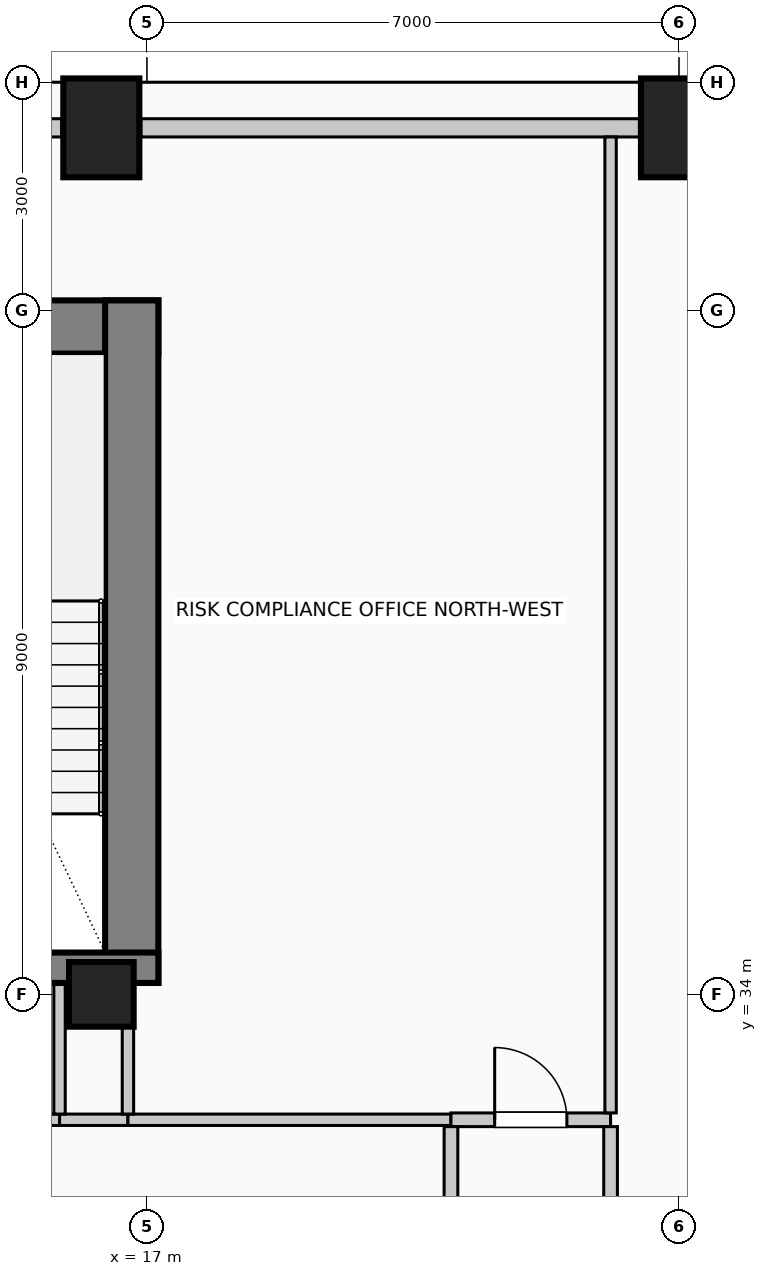
"""IFC4 building model, lengths in metres.
Left out: names, types, materials, properties, quantities, classifications, styles, units other than length and angle.
Written with IfcOpenShell. Run it as: python <this file> out.ifc"""

import sys

from ifc_helpers import new_model, si_unit, direction, frame, frame_2d, origin, origin_2d, place, context, subcontext, project, spatial, rectangle, circle, extrude, element, fill, save


model = new_model("IFC4")
c1 = context("Model", 3, precision=1e-05, world=origin(), true_north=direction((0.0, 1.0)))
c2 = subcontext(c1, "Body", "Model", "MODEL_VIEW")
j1 = project(units=[si_unit("LENGTHUNIT", "METRE"), si_unit("PLANEANGLEUNIT", "RADIAN")], contexts=[c1])
p1 = place(None, origin())
s1 = spatial("IfcSite", under=j1, at=p1, CompositionType="ELEMENT")
p2 = place(p1, origin())
s2 = spatial("IfcBuilding", under=s1, at=p2, CompositionType="ELEMENT")
p3 = place(p2, frame((0.0, 0.0, 256.6)))
s3 = spatial("IfcBuildingStorey", under=s2, at=p3, CompositionType="ELEMENT", Elevation=256.6)
p4 = place(p3, frame((2.85, 42.78, 0.0), z_axis=(0.0, 0.0, 1.0), x_axis=(1.0, 0.0, 0.0)))
e1 = element("IfcWall", 1, at=p4, inside=s3, PredefinedType="SHEAR", context=c2, shape_type="SweptSolid", body=[
    extrude(rectangle(XDim=14.3, YDim=0.7, at=frame_2d((7.15, 0.0))), origin(), (0.0, 0.0, 1.0), 4.0),
])
p5 = place(p3, frame((16.8, 34.15, 0.0), z_axis=(0.0, 0.0, 1.0), x_axis=(0.0, 1.0, 0.0)))
e2 = element("IfcWall", 2, at=p5, inside=s3, PredefinedType="SHEAR", context=c2, shape_type="SweptSolid", body=[
    extrude(rectangle(XDim=8.98, YDim=0.7, at=frame_2d((4.49, 0.0))), origin(), (0.0, 0.0, 1.0), 4.0),
])
p6 = place(p3, frame((12.29, 34.35, 0.0), z_axis=(0.0, 0.0, 1.0), x_axis=(1.0, 0.0, 0.0)))
e3 = element("IfcWall", 3, at=p6, inside=s3, PredefinedType="SHEAR", context=c2, shape_type="SweptSolid", body=[
    extrude(rectangle(XDim=4.86, YDim=0.4, at=frame_2d((2.43, 0.0))), origin(), (0.0, 0.0, 1.0), 4.0),
])
p7 = place(p6, frame((1.4, 0.0, 0.0)))
e4 = element("IfcOpeningElement", 4, at=p7, cuts=e3, PredefinedType="OPENING", context=c2, shape_type="SweptSolid", body=[
    extrude(rectangle(XDim=1.15, YDim=2.2, at=frame_2d((0.575, 1.1))), frame((0.0, 0.21, 0.0), z_axis=(0.0, -1.0, 0.0), x_axis=(1.0, 0.0, 0.0)), (0.0, 0.0, 1.0), 0.42),
])
for number, where, z_axis, x_axis in (
    (5, (16.4, 45.4, 0.0), (0.0, 0.0, 1.0), (1.0, 0.0, 0.0)),
    (6, (24.0, 45.4, 0.0), (0.0, 0.0, 1.0), (1.0, 0.0, 0.0)),
):
    element("IfcColumn", number, at=place(p3, frame(where, z_axis=z_axis, x_axis=x_axis)), inside=s3, PredefinedType="COLUMN", context=c2, shape_type="SweptSolid", body=[
        extrude(rectangle(XDim=1.0, YDim=1.3, at=origin_2d()), origin(), (0.0, 0.0, 1.0), 4.0),
    ])
p8 = place(p3, frame((16.4, 34.0, 0.0), z_axis=(0.0, 0.0, 1.0), x_axis=(1.0, 0.0, 0.0)))
e7 = element("IfcColumn", 7, at=p8, inside=s3, PredefinedType="COLUMN", context=c2, shape_type="SweptSolid", body=[
    extrude(circle(Radius=0.425, at=origin_2d()), origin(), (0.0, 0.0, 1.0), 4.0),
])
p9 = place(p3, frame((14.395, 45.4, 0.0), z_axis=(0.0, 0.0, 1.0), x_axis=(1.0, 0.0, 0.0)))
e8 = element("IfcWall", 8, at=p9, inside=s3, PredefinedType="SOLIDWALL", context=c2, shape_type="SweptSolid", body=[
    extrude(rectangle(XDim=1.485, YDim=0.24, at=frame_2d((0.742, 0.0))), origin(), (0.0, 0.0, 1.0), 3.0),
])
p10 = place(p3, frame((16.92, 45.4, 0.0), z_axis=(0.0, 0.0, 1.0), x_axis=(1.0, 0.0, 0.0)))
e9 = element("IfcWall", 9, at=p10, inside=s3, PredefinedType="SOLIDWALL", context=c2, shape_type="SweptSolid", body=[
    extrude(rectangle(XDim=6.56, YDim=0.24, at=frame_2d((3.28, 0.0))), origin(), (0.0, 0.0, 1.0), 3.0),
])
p11 = place(p3, frame((12.33, 32.35, 0.0), z_axis=(0.0, 0.0, 1.0), x_axis=(1.0, 0.0, 0.0)))
e10 = element("IfcWall", 10, at=p11, inside=s3, PredefinedType="PARTITIONING", context=c2, shape_type="SweptSolid", body=[
    extrude(rectangle(XDim=3.52, YDim=0.15, at=frame_2d((1.76, 0.0))), origin(), (0.0, 0.0, 1.0), 3.75),
])
p12 = place(p11, frame((1.235, 0.0, 0.0)))
e11 = element("IfcOpeningElement", 11, at=p12, cuts=e10, PredefinedType="OPENING", context=c2, shape_type="SweptSolid", body=[
    extrude(rectangle(XDim=1.05, YDim=2.15, at=frame_2d((0.525, 1.075))), frame((0.0, 0.085, 0.0), z_axis=(0.0, -1.0, 0.0), x_axis=(1.0, 0.0, 0.0)), (0.0, 0.0, 1.0), 0.17),
])
p13 = place(p3, frame((15.85, 32.35, 0.0), z_axis=(0.0, 0.0, 1.0), x_axis=(1.0, 0.0, 0.0)))
e12 = element("IfcWall", 12, at=p13, inside=s3, PredefinedType="PARTITIONING", context=c2, shape_type="SweptSolid", body=[
    extrude(rectangle(XDim=0.9, YDim=0.15, at=frame_2d((0.45, 0.0))), origin(), (0.0, 0.0, 1.0), 3.75),
])
p14 = place(p3, frame((16.75, 32.35, 0.0), z_axis=(0.0, 0.0, 1.0), x_axis=(1.0, 0.0, 0.0)))
e13 = element("IfcWall", 13, at=p14, inside=s3, PredefinedType="PARTITIONING", context=c2, shape_type="SweptSolid", body=[
    extrude(rectangle(XDim=4.25, YDim=0.15, at=frame_2d((2.125, 0.0))), origin(), (0.0, 0.0, 1.0), 3.75),
])
p15 = place(p3, frame((21.0, 32.35, 0.0), z_axis=(0.0, 0.0, 1.0), x_axis=(1.0, 0.0, 0.0)))
e14 = element("IfcWall", 14, at=p15, inside=s3, PredefinedType="PARTITIONING", context=c2, shape_type="SweptSolid", body=[
    extrude(rectangle(XDim=2.1, YDim=0.18, at=frame_2d((1.05, 0.0))), origin(), (0.0, 0.0, 1.0), 3.75),
])
p16 = place(p15, frame((0.575, 0.0, 0.0)))
e15 = element("IfcOpeningElement", 15, at=p16, cuts=e14, PredefinedType="OPENING", context=c2, shape_type="SweptSolid", body=[
    extrude(rectangle(XDim=0.95, YDim=2.15, at=frame_2d((0.475, 1.075))), frame((0.0, 0.1, 0.0), z_axis=(0.0, -1.0, 0.0), x_axis=(1.0, 0.0, 0.0)), (0.0, 0.0, 1.0), 0.2),
])
p17 = place(p3, frame((15.85, 32.425, 0.0), z_axis=(0.0, 0.0, 1.0), x_axis=(0.0, 1.0, 0.0)))
e16 = element("IfcWall", 16, at=p17, inside=s3, PredefinedType="PARTITIONING", context=c2, shape_type="SweptSolid", body=[
    extrude(rectangle(XDim=1.725, YDim=0.15, at=frame_2d((0.862, 0.0))), origin(), (0.0, 0.0, 1.0), 3.75),
])
p18 = place(p3, frame((16.75, 32.425, 0.0), z_axis=(0.0, 0.0, 1.0), x_axis=(0.0, 1.0, 0.0)))
e17 = element("IfcWall", 17, at=p18, inside=s3, PredefinedType="PARTITIONING", context=c2, shape_type="SweptSolid", body=[
    extrude(rectangle(XDim=1.15, YDim=0.15, at=frame_2d((0.575, 0.0))), origin(), (0.0, 0.0, 1.0), 3.75),
])
p19 = place(p3, frame((21.0, 29.925, 0.0), z_axis=(0.0, 0.0, 1.0), x_axis=(0.0, 1.0, 0.0)))
e18 = element("IfcWall", 18, at=p19, inside=s3, PredefinedType="PARTITIONING", context=c2, shape_type="SweptSolid", body=[
    extrude(rectangle(XDim=2.335, YDim=0.18, at=frame_2d((1.167, 0.0))), origin(), (0.0, 0.0, 1.0), 3.75),
])
p20 = place(p3, frame((23.1, 29.14, 0.0), z_axis=(0.0, 0.0, 1.0), x_axis=(0.0, 1.0, 0.0)))
e19 = element("IfcWall", 19, at=p20, inside=s3, PredefinedType="PARTITIONING", context=c2, shape_type="SweptSolid", body=[
    extrude(rectangle(XDim=3.12, YDim=0.18, at=frame_2d((1.56, 0.0))), origin(), (0.0, 0.0, 1.0), 3.75),
])
p21 = place(p3, frame((23.1, 32.44, 0.0), z_axis=(0.0, 0.0, 1.0), x_axis=(0.0, 1.0, 0.0)))
e20 = element("IfcWall", 20, at=p21, inside=s3, PredefinedType="PARTITIONING", context=c2, shape_type="SweptSolid", body=[
    extrude(rectangle(XDim=12.84, YDim=0.15, at=frame_2d((6.42, 0.0))), origin(), (0.0, 0.0, 1.0), 3.75),
])
p22 = place(p16, origin())
e21 = element("IfcDoor", 21, at=p22, inside=s3, OperationType="SINGLE_SWING_LEFT", PredefinedType="DOOR", context=c2, shape_type="SweptSolid", body=[
    extrude(rectangle(XDim=0.95, YDim=2.15, at=frame_2d((0.475, 1.075))), frame((0.0, 0.025, 0.0), z_axis=(0.0, -1.0, 0.0), x_axis=(1.0, 0.0, 0.0)), (0.0, 0.0, 1.0), 0.05),
])
fill(e15, e21)
save(model, sys.argv[1])
